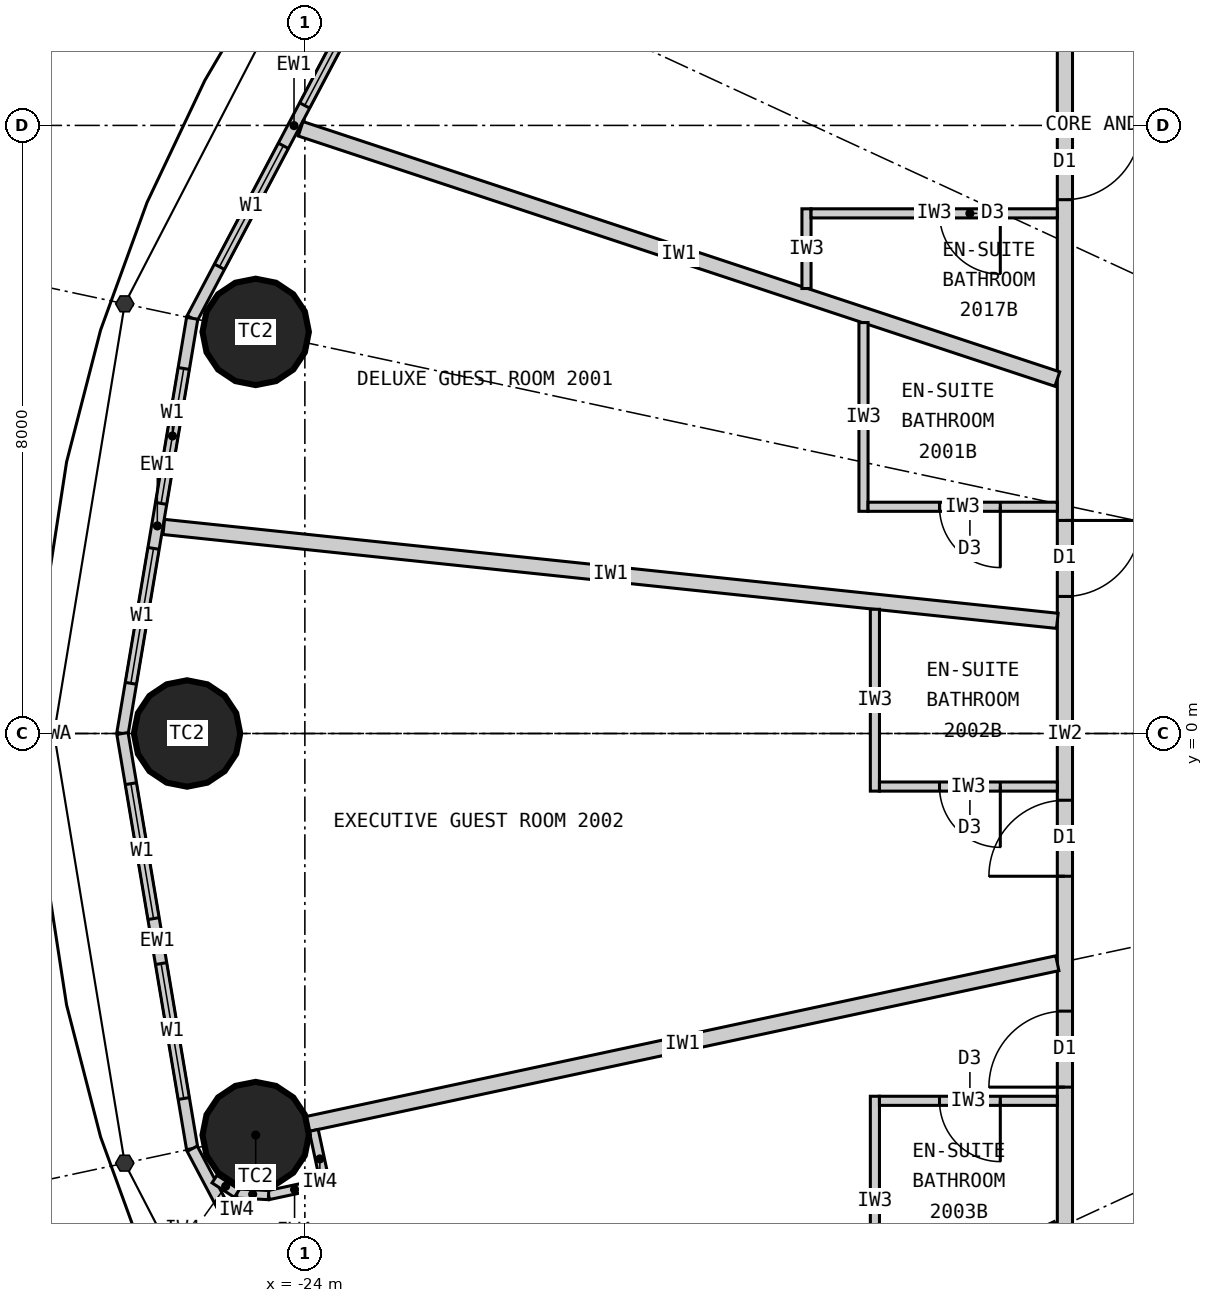
"""IFC4 building model, lengths in metres.
Left out: names, types, materials, properties, quantities, classifications, styles, units other than length and angle.
Written with IfcOpenShell. Run it as: python <this file> out.ifc"""

import sys

from ifc_helpers import new_model, si_unit, direction, frame, frame_2d, origin, origin_2d, place, context, subcontext, project, spatial, rectangle, circle, extrude, element, fill, save


model = new_model("IFC4")
c1 = context("Model", 3, precision=1e-05, world=origin(), true_north=direction((0.0, 1.0)))
c2 = subcontext(c1, "Body", "Model", "MODEL_VIEW")
j1 = project(units=[si_unit("LENGTHUNIT", "METRE"), si_unit("PLANEANGLEUNIT", "RADIAN")], contexts=[c1])
p1 = place(None, origin())
s1 = spatial("IfcSite", under=j1, at=p1, CompositionType="ELEMENT")
p2 = place(p1, origin())
s2 = spatial("IfcBuilding", under=s1, at=p2, CompositionType="ELEMENT")
p3 = place(p2, frame((0.0, 0.0, 80.4)))
s3 = spatial("IfcBuildingStorey", under=s2, at=p3, CompositionType="ELEMENT", Elevation=80.4)
for number, where, z_axis, x_axis in (
    (1, (-24.647, 5.283, 0.0), (0.0, 0.0, 1.0), (1.0, 0.0, 0.0)),
    (2, (-25.55, 0.0, 0.0), (0.0, 0.0, 1.0), (1.0, 0.0, 0.0)),
    (3, (-24.647, -5.283, 0.0), (0.0, 0.0, 1.0), (1.0, 0.0, 0.0)),
):
    element("IfcColumn", number, at=place(p3, frame(where, z_axis=z_axis, x_axis=x_axis)), inside=s3, PredefinedType="COLUMN", context=c2, shape_type="SweptSolid", body=[
        extrude(circle(Radius=0.7, at=origin_2d()), origin(), (0.0, 0.0, 1.0), 3.3),
    ])
p4 = place(p3, frame((-22.803, 10.532, 0.0), z_axis=(0.0, 0.0, 1.0), x_axis=(-0.467296867008, -0.884100468321, 0.0)))
e4 = element("IfcWall", 4, at=p4, inside=s3, PredefinedType="ELEMENTEDWALL", context=c2, shape_type="SweptSolid", body=[
    extrude(rectangle(XDim=5.734, YDim=0.15, at=frame_2d((2.867, 0.0))), origin(), (0.0, 0.0, 1.0), 3.12),
])
p5 = place(p4, frame((0.767, 0.0, 0.9)))
e5 = element("IfcOpeningElement", 5, at=p5, cuts=e4, PredefinedType="OPENING", context=c2, shape_type="SweptSolid", body=[
    extrude(rectangle(XDim=1.8, YDim=1.9, at=frame_2d((0.9, 0.95))), frame((0.0, 0.085, 0.0), z_axis=(0.0, -1.0, 0.0), x_axis=(1.0, 0.0, 0.0)), (0.0, 0.0, 1.0), 0.17),
])
p6 = place(p4, frame((3.167, 0.0, 0.9)))
e6 = element("IfcOpeningElement", 6, at=p6, cuts=e4, PredefinedType="OPENING", context=c2, shape_type="SweptSolid", body=[
    extrude(rectangle(XDim=1.8, YDim=1.9, at=frame_2d((0.9, 0.95))), frame((0.0, 0.085, 0.0), z_axis=(0.0, -1.0, 0.0), x_axis=(1.0, 0.0, 0.0)), (0.0, 0.0, 1.0), 0.17),
])
p7 = place(p3, frame((-25.482, 5.462, 0.0), z_axis=(0.0, 0.0, 1.0), x_axis=(-0.165642551694, -0.986185857264, 0.0)))
e7 = element("IfcWall", 7, at=p7, inside=s3, PredefinedType="ELEMENTEDWALL", context=c2, shape_type="SweptSolid", body=[
    extrude(rectangle(XDim=5.539, YDim=0.15, at=frame_2d((2.77, 0.0))), origin(), (0.0, 0.0, 1.0), 3.12),
])
p8 = place(p7, frame((0.669, 0.0, 0.9)))
e8 = element("IfcOpeningElement", 8, at=p8, cuts=e7, PredefinedType="OPENING", context=c2, shape_type="SweptSolid", body=[
    extrude(rectangle(XDim=1.8, YDim=1.9, at=frame_2d((0.9, 0.95))), frame((0.0, 0.085, 0.0), z_axis=(0.0, -1.0, 0.0), x_axis=(1.0, 0.0, 0.0)), (0.0, 0.0, 1.0), 0.17),
])
p9 = place(p7, frame((3.07, 0.0, 0.9)))
e9 = element("IfcOpeningElement", 9, at=p9, cuts=e7, PredefinedType="OPENING", context=c2, shape_type="SweptSolid", body=[
    extrude(rectangle(XDim=1.8, YDim=1.9, at=frame_2d((0.9, 0.95))), frame((0.0, 0.085, 0.0), z_axis=(0.0, -1.0, 0.0), x_axis=(1.0, 0.0, 0.0)), (0.0, 0.0, 1.0), 0.17),
])
p10 = place(p3, frame((-26.4, 0.0, 0.0), z_axis=(0.0, 0.0, 1.0), x_axis=(0.165642551694, -0.986185857264, 0.0)))
e10 = element("IfcWall", 10, at=p10, inside=s3, PredefinedType="ELEMENTEDWALL", context=c2, shape_type="SweptSolid", body=[
    extrude(rectangle(XDim=5.539, YDim=0.15, at=frame_2d((2.77, 0.0))), origin(), (0.0, 0.0, 1.0), 3.12),
])
p11 = place(p10, frame((0.669, 0.0, 0.9)))
e11 = element("IfcOpeningElement", 11, at=p11, cuts=e10, PredefinedType="OPENING", context=c2, shape_type="SweptSolid", body=[
    extrude(rectangle(XDim=1.8, YDim=1.9, at=frame_2d((0.9, 0.95))), frame((0.0, 0.085, 0.0), z_axis=(0.0, -1.0, 0.0), x_axis=(1.0, 0.0, 0.0)), (0.0, 0.0, 1.0), 0.17),
])
p12 = place(p10, frame((3.07, 0.0, 0.9)))
e12 = element("IfcOpeningElement", 12, at=p12, cuts=e10, PredefinedType="OPENING", context=c2, shape_type="SweptSolid", body=[
    extrude(rectangle(XDim=1.8, YDim=1.9, at=frame_2d((0.9, 0.95))), frame((0.0, 0.085, 0.0), z_axis=(0.0, -1.0, 0.0), x_axis=(1.0, 0.0, 0.0)), (0.0, 0.0, 1.0), 0.17),
])
p13 = place(p3, frame((-25.482, -5.462, 0.0), z_axis=(0.0, 0.0, 1.0), x_axis=(0.467296867008, -0.884100468321, 0.0)))
e13 = element("IfcWall", 13, at=p13, inside=s3, PredefinedType="ELEMENTEDWALL", context=c2, shape_type="SweptSolid", body=[
    extrude(rectangle(XDim=5.734, YDim=0.15, at=frame_2d((2.867, 0.0))), origin(), (0.0, 0.0, 1.0), 3.12),
])
p14 = place(p13, frame((0.767, 0.0, 0.9)))
e14 = element("IfcOpeningElement", 14, at=p14, cuts=e13, PredefinedType="OPENING", context=c2, shape_type="SweptSolid", body=[
    extrude(rectangle(XDim=1.8, YDim=1.9, at=frame_2d((0.9, 0.95))), frame((0.0, 0.085, 0.0), z_axis=(0.0, -1.0, 0.0), x_axis=(1.0, 0.0, 0.0)), (0.0, 0.0, 1.0), 0.17),
])
p15 = place(p13, frame((3.167, 0.0, 0.9)))
e15 = element("IfcOpeningElement", 15, at=p15, cuts=e13, PredefinedType="OPENING", context=c2, shape_type="SweptSolid", body=[
    extrude(rectangle(XDim=1.8, YDim=1.9, at=frame_2d((0.9, 0.95))), frame((0.0, 0.085, 0.0), z_axis=(0.0, -1.0, 0.0), x_axis=(1.0, 0.0, 0.0)), (0.0, 0.0, 1.0), 0.17),
])
p16 = place(p3, frame((-14.0, 9.9, 0.0), z_axis=(0.0, 0.0, 1.0), x_axis=(0.0, -1.0, 0.0)))
e16 = element("IfcWall", 16, at=p16, inside=s3, PredefinedType="PARTITIONING", context=c2, shape_type="SweptSolid", body=[
    extrude(rectangle(XDim=19.8, YDim=0.2, at=frame_2d((9.9, 0.0))), origin(), (0.0, 0.0, 1.0), 3.12),
])
p17 = place(p16, frame((7.097, 0.0, 0.0)))
e17 = element("IfcOpeningElement", 17, at=p17, cuts=e16, PredefinedType="OPENING", context=c2, shape_type="SweptSolid", body=[
    extrude(rectangle(XDim=1.0, YDim=2.2, at=frame_2d((0.5, 1.1))), frame((0.0, 0.11, 0.0), z_axis=(0.0, -1.0, 0.0), x_axis=(1.0, 0.0, 0.0)), (0.0, 0.0, 1.0), 0.22),
])
p18 = place(p16, frame((10.778, 0.0, 0.0)))
e18 = element("IfcOpeningElement", 18, at=p18, cuts=e16, PredefinedType="OPENING", context=c2, shape_type="SweptSolid", body=[
    extrude(rectangle(XDim=1.0, YDim=2.2, at=frame_2d((0.5, 1.1))), frame((0.0, 0.11, 0.0), z_axis=(0.0, -1.0, 0.0), x_axis=(1.0, 0.0, 0.0)), (0.0, 0.0, 1.0), 0.22),
])
p19 = place(p16, frame((13.552, 0.0, 0.0)))
e19 = element("IfcOpeningElement", 19, at=p19, cuts=e16, PredefinedType="OPENING", context=c2, shape_type="SweptSolid", body=[
    extrude(rectangle(XDim=1.0, YDim=2.2, at=frame_2d((0.5, 1.1))), frame((0.0, 0.11, 0.0), z_axis=(0.0, -1.0, 0.0), x_axis=(1.0, 0.0, 0.0)), (0.0, 0.0, 1.0), 0.22),
])
p20 = place(p16, frame((18.698, 0.0, 0.0)))
e20 = element("IfcOpeningElement", 20, at=p20, cuts=e16, PredefinedType="OPENING", context=c2, shape_type="SweptSolid", body=[
    extrude(rectangle(XDim=1.0, YDim=2.2, at=frame_2d((0.5, 1.1))), frame((0.0, 0.11, 0.0), z_axis=(0.0, -1.0, 0.0), x_axis=(1.0, 0.0, 0.0)), (0.0, 0.0, 1.0), 0.22),
])
p21 = place(p16, frame((1.877, 0.0, 0.0)))
e21 = element("IfcOpeningElement", 21, at=p21, cuts=e16, PredefinedType="OPENING", context=c2, shape_type="SweptSolid", body=[
    extrude(rectangle(XDim=1.0, YDim=2.2, at=frame_2d((0.5, 1.1))), frame((0.0, 0.11, 0.0), z_axis=(0.0, -1.0, 0.0), x_axis=(1.0, 0.0, 0.0)), (0.0, 0.0, 1.0), 0.22),
])
p22 = place(p3, frame((-14.1, 4.663, 0.0), z_axis=(0.0, 0.0, 1.0), x_axis=(-0.949432655039, 0.31397075269, 0.0)))
e22 = element("IfcWall", 22, at=p22, inside=s3, PredefinedType="PARTITIONING", context=c2, shape_type="SweptSolid", body=[
    extrude(rectangle(XDim=10.486, YDim=0.2, at=frame_2d((5.243, 0.0))), origin(), (0.0, 0.0, 1.0), 3.12),
])
p23 = place(p3, frame((-14.1, 1.482, 0.0), z_axis=(0.0, 0.0, 1.0), x_axis=(-0.994522076235, 0.104526742422, 0.0)))
e23 = element("IfcWall", 23, at=p23, inside=s3, PredefinedType="PARTITIONING", context=c2, shape_type="SweptSolid", body=[
    extrude(rectangle(XDim=11.821, YDim=0.2, at=frame_2d((5.91, 0.0))), origin(), (0.0, 0.0, 1.0), 2.32),
])
p24 = place(p3, frame((-14.1, -3.022, 0.0), z_axis=(0.0, 0.0, 1.0), x_axis=(-0.977790014929, -0.209586943072, 0.0)))
e24 = element("IfcWall", 24, at=p24, inside=s3, PredefinedType="PARTITIONING", context=c2, shape_type="SweptSolid", body=[
    extrude(rectangle(XDim=10.087, YDim=0.2, at=frame_2d((5.043, 0.0))), origin(), (0.0, 0.0, 1.0), 2.32),
])
p25 = place(p3, frame((-14.1, -6.512, 0.0), z_axis=(0.0, 0.0, 1.0), x_axis=(-0.907832871056, -0.419332181247, 0.0)))
e25 = element("IfcWall", 25, at=p25, inside=s3, PredefinedType="PARTITIONING", context=c2, shape_type="SweptSolid", body=[
    extrude(rectangle(XDim=8.023, YDim=0.2, at=frame_2d((4.011, 0.0))), origin(), (0.0, 0.0, 1.0), 2.32),
])
p26 = place(p3, frame((-16.65, 5.406, 0.0), z_axis=(0.0, 0.0, 1.0), x_axis=(0.0, -1.0, 0.0)))
e26 = element("IfcWall", 26, at=p26, inside=s3, PredefinedType="PARTITIONING", context=c2, shape_type="SweptSolid", body=[
    extrude(rectangle(XDim=2.483, YDim=0.12, at=frame_2d((1.242, 0.0))), origin(), (0.0, 0.0, 1.0), 3.12),
])
p27 = place(p3, frame((-14.1, 2.983, 0.0), z_axis=(0.0, 0.0, 1.0), x_axis=(-1.0, 0.0, 0.0)))
e27 = element("IfcWall", 27, at=p27, inside=s3, PredefinedType="PARTITIONING", context=c2, shape_type="SweptSolid", body=[
    extrude(rectangle(XDim=2.49, YDim=0.12, at=frame_2d((1.245, 0.0))), origin(), (0.0, 0.0, 1.0), 3.12),
])
p28 = place(p27, frame((0.75, 0.0, 0.0)))
e28 = element("IfcOpeningElement", 28, at=p28, cuts=e27, PredefinedType="OPENING", context=c2, shape_type="SweptSolid", body=[
    extrude(rectangle(XDim=0.8, YDim=2.1, at=frame_2d((0.4, 1.05))), frame((0.0, 0.07, 0.0), z_axis=(0.0, -1.0, 0.0), x_axis=(1.0, 0.0, 0.0)), (0.0, 0.0, 1.0), 0.14),
])
p29 = place(p3, frame((-16.5, 1.634, 0.0), z_axis=(0.0, 0.0, 1.0), x_axis=(0.0, -1.0, 0.0)))
e29 = element("IfcWall", 29, at=p29, inside=s3, PredefinedType="PARTITIONING", context=c2, shape_type="SweptSolid", body=[
    extrude(rectangle(XDim=2.392, YDim=0.12, at=frame_2d((1.196, 0.0))), origin(), (0.0, 0.0, 1.0), 3.12),
])
p30 = place(p3, frame((-14.1, -0.698, 0.0), z_axis=(0.0, 0.0, 1.0), x_axis=(-1.0, 0.0, 0.0)))
e30 = element("IfcWall", 30, at=p30, inside=s3, PredefinedType="PARTITIONING", context=c2, shape_type="SweptSolid", body=[
    extrude(rectangle(XDim=2.34, YDim=0.12, at=frame_2d((1.17, 0.0))), origin(), (0.0, 0.0, 1.0), 3.12),
])
p31 = place(p30, frame((0.75, 0.0, 0.0)))
e31 = element("IfcOpeningElement", 31, at=p31, cuts=e30, PredefinedType="OPENING", context=c2, shape_type="SweptSolid", body=[
    extrude(rectangle(XDim=0.8, YDim=2.1, at=frame_2d((0.4, 1.05))), frame((0.0, 0.07, 0.0), z_axis=(0.0, -1.0, 0.0), x_axis=(1.0, 0.0, 0.0)), (0.0, 0.0, 1.0), 0.14),
])
p32 = place(p3, frame((-16.5, -7.521, 0.0), z_axis=(0.0, 0.0, 1.0), x_axis=(0.0, 1.0, 0.0)))
e32 = element("IfcWall", 32, at=p32, inside=s3, PredefinedType="PARTITIONING", context=c2, shape_type="SweptSolid", body=[
    extrude(rectangle(XDim=2.749, YDim=0.12, at=frame_2d((1.374, 0.0))), origin(), (0.0, 0.0, 1.0), 3.12),
])
p33 = place(p3, frame((-14.1, -4.833, 0.0), z_axis=(0.0, 0.0, 1.0), x_axis=(-1.0, 0.0, 0.0)))
e33 = element("IfcWall", 33, at=p33, inside=s3, PredefinedType="PARTITIONING", context=c2, shape_type="SweptSolid", body=[
    extrude(rectangle(XDim=2.34, YDim=0.12, at=frame_2d((1.17, 0.0))), origin(), (0.0, 0.0, 1.0), 3.12),
])
p34 = place(p33, frame((0.75, 0.0, 0.0)))
e34 = element("IfcOpeningElement", 34, at=p34, cuts=e33, PredefinedType="OPENING", context=c2, shape_type="SweptSolid", body=[
    extrude(rectangle(XDim=0.8, YDim=2.1, at=frame_2d((0.4, 1.05))), frame((0.0, 0.07, 0.0), z_axis=(0.0, -1.0, 0.0), x_axis=(1.0, 0.0, 0.0)), (0.0, 0.0, 1.0), 0.14),
])
p35 = place(p3, frame((-17.4, 5.854, 0.0), z_axis=(0.0, 0.0, 1.0), x_axis=(0.0, 1.0, 0.0)))
e35 = element("IfcWall", 35, at=p35, inside=s3, PredefinedType="PARTITIONING", context=c2, shape_type="SweptSolid", body=[
    extrude(rectangle(XDim=1.049, YDim=0.12, at=frame_2d((0.524, 0.0))), origin(), (0.0, 0.0, 1.0), 3.12),
])
p36 = place(p3, frame((-14.1, 6.843, 0.0), z_axis=(0.0, 0.0, 1.0), x_axis=(-1.0, 0.0, 0.0)))
e36 = element("IfcWall", 36, at=p36, inside=s3, PredefinedType="PARTITIONING", context=c2, shape_type="SweptSolid", body=[
    extrude(rectangle(XDim=3.24, YDim=0.12, at=frame_2d((1.62, 0.0))), origin(), (0.0, 0.0, 1.0), 3.12),
])
p37 = place(p36, frame((0.75, 0.0, 0.0)))
e37 = element("IfcOpeningElement", 37, at=p37, cuts=e36, PredefinedType="OPENING", context=c2, shape_type="SweptSolid", body=[
    extrude(rectangle(XDim=0.8, YDim=2.1, at=frame_2d((0.4, 1.05))), frame((0.0, 0.07, 0.0), z_axis=(0.0, -1.0, 0.0), x_axis=(1.0, 0.0, 0.0)), (0.0, 0.0, 1.0), 0.14),
])
p38 = place(p3, frame((-23.883, -5.222, 0.0), z_axis=(0.0, 0.0, 1.0), x_axis=(0.209311842415, -0.977848941619, 0.0)))
e38 = element("IfcWall", 38, at=p38, inside=s3, PredefinedType="PARTITIONING", context=c2, shape_type="SweptSolid", body=[
    extrude(rectangle(XDim=0.768, YDim=0.12, at=frame_2d((0.384, 0.0))), origin(), (0.0, 0.0, 1.0), 3.12),
])
p39 = place(p3, frame((-23.793, -5.926, 0.0), z_axis=(0.0, 0.0, 1.0), x_axis=(-0.977792206673, -0.209576717621, 0.0)))
e39 = element("IfcWall", 39, at=p39, inside=s3, PredefinedType="PARTITIONING", context=c2, shape_type="SweptSolid", body=[
    extrude(rectangle(XDim=0.7, YDim=0.12, at=frame_2d((0.35, 0.0))), origin(), (0.0, 0.0, 1.0), 3.12),
])
p40 = place(p3, frame((-24.478, -6.073, 0.0), z_axis=(0.0, 0.0, 1.0), x_axis=(-0.998708262812, 0.05081147302, 0.0)))
e40 = element("IfcWall", 40, at=p40, inside=s3, PredefinedType="PARTITIONING", context=c2, shape_type="SweptSolid", body=[
    extrude(rectangle(XDim=0.418, YDim=0.12, at=frame_2d((0.209, 0.0))), origin(), (0.0, 0.0, 1.0), 3.12),
])
p41 = place(p3, frame((-24.895, -6.052, 0.0), z_axis=(0.0, 0.0, 1.0), x_axis=(-0.839495197275, 0.54336710772, 0.0)))
e41 = element("IfcWall", 41, at=p41, inside=s3, PredefinedType="PARTITIONING", context=c2, shape_type="SweptSolid", body=[
    extrude(rectangle(XDim=0.35, YDim=0.12, at=frame_2d((0.175, 0.0))), origin(), (0.0, 0.0, 1.0), 3.12),
])
p42 = place(p5, origin())
e42 = element("IfcWindow", 42, at=p42, inside=s3, PartitioningType="SINGLE_PANEL", PredefinedType="WINDOW", context=c2, shape_type="SweptSolid", body=[
    extrude(rectangle(XDim=1.8, YDim=1.9, at=frame_2d((0.9, 0.95))), frame((0.0, 0.03, 0.0), z_axis=(0.0, -1.0, 0.0), x_axis=(1.0, 0.0, 0.0)), (0.0, 0.0, 1.0), 0.06),
])
fill(e5, e42)
p43 = place(p6, origin())
e43 = element("IfcWindow", 43, at=p43, inside=s3, PartitioningType="SINGLE_PANEL", PredefinedType="WINDOW", context=c2, shape_type="SweptSolid", body=[
    extrude(rectangle(XDim=1.8, YDim=1.9, at=frame_2d((0.9, 0.95))), frame((0.0, 0.03, 0.0), z_axis=(0.0, -1.0, 0.0), x_axis=(1.0, 0.0, 0.0)), (0.0, 0.0, 1.0), 0.06),
])
fill(e6, e43)
p44 = place(p8, origin())
e44 = element("IfcWindow", 44, at=p44, inside=s3, PartitioningType="SINGLE_PANEL", PredefinedType="WINDOW", context=c2, shape_type="SweptSolid", body=[
    extrude(rectangle(XDim=1.8, YDim=1.9, at=frame_2d((0.9, 0.95))), frame((0.0, 0.03, 0.0), z_axis=(0.0, -1.0, 0.0), x_axis=(1.0, 0.0, 0.0)), (0.0, 0.0, 1.0), 0.06),
])
fill(e8, e44)
p45 = place(p9, origin())
e45 = element("IfcWindow", 45, at=p45, inside=s3, PartitioningType="SINGLE_PANEL", PredefinedType="WINDOW", context=c2, shape_type="SweptSolid", body=[
    extrude(rectangle(XDim=1.8, YDim=1.9, at=frame_2d((0.9, 0.95))), frame((0.0, 0.03, 0.0), z_axis=(0.0, -1.0, 0.0), x_axis=(1.0, 0.0, 0.0)), (0.0, 0.0, 1.0), 0.06),
])
fill(e9, e45)
p46 = place(p11, origin())
e46 = element("IfcWindow", 46, at=p46, inside=s3, PartitioningType="SINGLE_PANEL", PredefinedType="WINDOW", context=c2, shape_type="SweptSolid", body=[
    extrude(rectangle(XDim=1.8, YDim=1.9, at=frame_2d((0.9, 0.95))), frame((0.0, 0.03, 0.0), z_axis=(0.0, -1.0, 0.0), x_axis=(1.0, 0.0, 0.0)), (0.0, 0.0, 1.0), 0.06),
])
fill(e11, e46)
p47 = place(p12, origin())
e47 = element("IfcWindow", 47, at=p47, inside=s3, PartitioningType="SINGLE_PANEL", PredefinedType="WINDOW", context=c2, shape_type="SweptSolid", body=[
    extrude(rectangle(XDim=1.8, YDim=1.9, at=frame_2d((0.9, 0.95))), frame((0.0, 0.03, 0.0), z_axis=(0.0, -1.0, 0.0), x_axis=(1.0, 0.0, 0.0)), (0.0, 0.0, 1.0), 0.06),
])
fill(e12, e47)
p48 = place(p14, origin())
e48 = element("IfcWindow", 48, at=p48, inside=s3, PartitioningType="SINGLE_PANEL", PredefinedType="WINDOW", context=c2, shape_type="SweptSolid", body=[
    extrude(rectangle(XDim=1.8, YDim=1.9, at=frame_2d((0.9, 0.95))), frame((0.0, 0.03, 0.0), z_axis=(0.0, -1.0, 0.0), x_axis=(1.0, 0.0, 0.0)), (0.0, 0.0, 1.0), 0.06),
])
fill(e14, e48)
p49 = place(p28, origin())
e49 = element("IfcDoor", 49, at=p49, inside=s3, OperationType="SINGLE_SWING_LEFT", PredefinedType="DOOR", context=c2, shape_type="SweptSolid", body=[
    extrude(rectangle(XDim=0.8, YDim=2.1, at=frame_2d((0.4, 1.05))), frame((0.0, 0.025, 0.0), z_axis=(0.0, -1.0, 0.0), x_axis=(1.0, 0.0, 0.0)), (0.0, 0.0, 1.0), 0.05),
])
fill(e28, e49)
p50 = place(p17, origin())
e50 = element("IfcDoor", 50, at=p50, inside=s3, OperationType="SINGLE_SWING_LEFT", PredefinedType="DOOR", context=c2, shape_type="SweptSolid", body=[
    extrude(rectangle(XDim=1.0, YDim=2.2, at=frame_2d((0.5, 1.1))), frame((0.0, 0.025, 0.0), z_axis=(0.0, -1.0, 0.0), x_axis=(1.0, 0.0, 0.0)), (0.0, 0.0, 1.0), 0.05),
])
fill(e17, e50)
p51 = place(p31, origin())
e51 = element("IfcDoor", 51, at=p51, inside=s3, OperationType="SINGLE_SWING_LEFT", PredefinedType="DOOR", context=c2, shape_type="SweptSolid", body=[
    extrude(rectangle(XDim=0.8, YDim=2.1, at=frame_2d((0.4, 1.05))), frame((0.0, 0.025, 0.0), z_axis=(0.0, -1.0, 0.0), x_axis=(1.0, 0.0, 0.0)), (0.0, 0.0, 1.0), 0.05),
])
fill(e31, e51)
p52 = place(p18, origin())
e52 = element("IfcDoor", 52, at=p52, inside=s3, OperationType="SINGLE_SWING_RIGHT", PredefinedType="DOOR", context=c2, shape_type="SweptSolid", body=[
    extrude(rectangle(XDim=1.0, YDim=2.2, at=frame_2d((0.5, 1.1))), frame((0.0, 0.025, 0.0), z_axis=(0.0, -1.0, 0.0), x_axis=(1.0, 0.0, 0.0)), (0.0, 0.0, 1.0), 0.05),
])
fill(e18, e52)
p53 = place(p34, origin())
e53 = element("IfcDoor", 53, at=p53, inside=s3, OperationType="SINGLE_SWING_LEFT", PredefinedType="DOOR", context=c2, shape_type="SweptSolid", body=[
    extrude(rectangle(XDim=0.8, YDim=2.1, at=frame_2d((0.4, 1.05))), frame((0.0, 0.025, 0.0), z_axis=(0.0, -1.0, 0.0), x_axis=(1.0, 0.0, 0.0)), (0.0, 0.0, 1.0), 0.05),
])
fill(e34, e53)
p54 = place(p19, origin())
e54 = element("IfcDoor", 54, at=p54, inside=s3, OperationType="SINGLE_SWING_RIGHT", PredefinedType="DOOR", context=c2, shape_type="SweptSolid", body=[
    extrude(rectangle(XDim=1.0, YDim=2.2, at=frame_2d((0.5, 1.1))), frame((0.0, 0.025, 0.0), z_axis=(0.0, -1.0, 0.0), x_axis=(1.0, 0.0, 0.0)), (0.0, 0.0, 1.0), 0.05),
])
fill(e19, e54)
p55 = place(p37, origin())
e55 = element("IfcDoor", 55, at=p55, inside=s3, OperationType="SINGLE_SWING_LEFT", PredefinedType="DOOR", context=c2, shape_type="SweptSolid", body=[
    extrude(rectangle(XDim=0.8, YDim=2.1, at=frame_2d((0.4, 1.05))), frame((0.0, 0.025, 0.0), z_axis=(0.0, -1.0, 0.0), x_axis=(1.0, 0.0, 0.0)), (0.0, 0.0, 1.0), 0.05),
])
fill(e37, e55)
p56 = place(p21, origin())
e56 = element("IfcDoor", 56, at=p56, inside=s3, OperationType="SINGLE_SWING_LEFT", PredefinedType="DOOR", context=c2, shape_type="SweptSolid", body=[
    extrude(rectangle(XDim=1.0, YDim=2.2, at=frame_2d((0.5, 1.1))), frame((0.0, 0.025, 0.0), z_axis=(0.0, -1.0, 0.0), x_axis=(1.0, 0.0, 0.0)), (0.0, 0.0, 1.0), 0.05),
])
fill(e21, e56)
save(model, sys.argv[1])
